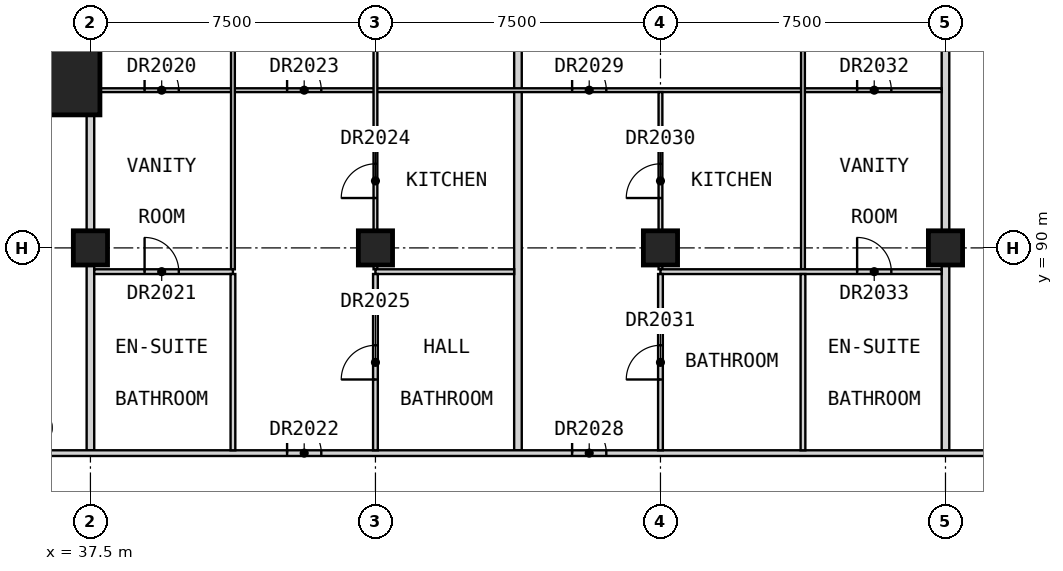
"""IFC4 building model, lengths in metres.
Left out: names, types, materials, properties, quantities, classifications, styles, units other than length and angle.
Written with IfcOpenShell. Run it as: python <this file> out.ifc"""

import sys

from ifc_helpers import new_model, si_unit, direction, frame, frame_2d, origin, origin_2d, place, context, subcontext, project, spatial, rectangle, extrude, element, fill, save


model = new_model("IFC4")
c1 = context("Model", 3, precision=1e-05, world=origin(), true_north=direction((0.0, 1.0)))
c2 = subcontext(c1, "Body", "Model", "MODEL_VIEW")
j1 = project(units=[si_unit("LENGTHUNIT", "METRE"), si_unit("PLANEANGLEUNIT", "RADIAN")], contexts=[c1])
p1 = place(None, origin())
s1 = spatial("IfcSite", under=j1, at=p1, CompositionType="ELEMENT")
p2 = place(p1, origin())
s2 = spatial("IfcBuilding", under=s1, at=p2, CompositionType="ELEMENT")
p3 = place(p2, frame((0.0, 0.0, 182.7)))
s3 = spatial("IfcBuildingStorey", under=s2, at=p3, CompositionType="ELEMENT", Elevation=182.7)
for number, where, z_axis, x_axis in (
    (1, (37.5, 90.0, 0.0), (0.0, 0.0, 1.0), (1.0, 0.0, 0.0)),
    (2, (45.0, 90.0, 0.0), (0.0, 0.0, 1.0), (1.0, 0.0, 0.0)),
    (3, (52.5, 90.0, 0.0), (0.0, 0.0, 1.0), (1.0, 0.0, 0.0)),
    (4, (60.0, 90.0, 0.0), (0.0, 0.0, 1.0), (1.0, 0.0, 0.0)),
):
    element("IfcColumn", number, at=place(p3, frame(where, z_axis=z_axis, x_axis=x_axis)), inside=s3, PredefinedType="COLUMN", context=c2, shape_type="SweptSolid", body=[
        extrude(rectangle(XDim=0.9, YDim=0.9, at=origin_2d()), origin(), (0.0, 0.0, 1.0), 3.5),
    ])
p4 = place(p3, frame((36.125, 95.125, 0.0), z_axis=(0.0, 0.0, 1.0), x_axis=(1.0, 0.0, 0.0)))
e5 = element("IfcColumn", 5, at=p4, inside=s3, PredefinedType="COLUMN", context=c2, shape_type="SweptSolid", body=[
    extrude(rectangle(XDim=3.25, YDim=3.25, at=origin_2d()), origin(), (0.0, 0.0, 1.0), 3.5),
])
p5 = place(p3, frame((37.5, 84.675, 0.0), z_axis=(0.0, 0.0, 1.0), x_axis=(0.0, 1.0, 0.0)))
e6 = element("IfcWall", 6, at=p5, inside=s3, PredefinedType="PARTITIONING", context=c2, shape_type="SweptSolid", body=[
    extrude(rectangle(XDim=16.575, YDim=0.2, at=frame_2d((8.288, 0.0))), origin(), (0.0, 0.0, 1.0), 2.75),
])
p6 = place(p3, frame((48.75, 84.675, 0.0), z_axis=(0.0, 0.0, 1.0), x_axis=(0.0, 1.0, 0.0)))
e7 = element("IfcWall", 7, at=p6, inside=s3, PredefinedType="PARTITIONING", context=c2, shape_type="SweptSolid", body=[
    extrude(rectangle(XDim=15.765, YDim=0.2, at=frame_2d((7.882, 0.0))), origin(), (0.0, 0.0, 1.0), 3.25),
])
p7 = place(p3, frame((60.0, 84.675, 0.0), z_axis=(0.0, 0.0, 1.0), x_axis=(0.0, 1.0, 0.0)))
e8 = element("IfcWall", 8, at=p7, inside=s3, PredefinedType="PARTITIONING", context=c2, shape_type="SweptSolid", body=[
    extrude(rectangle(XDim=16.575, YDim=0.2, at=frame_2d((8.288, 0.0))), origin(), (0.0, 0.0, 1.0), 3.25),
])
p8 = place(p3, frame((33.75, 84.6, 0.0), z_axis=(0.0, 0.0, 1.0), x_axis=(1.0, 0.0, 0.0)))
e9 = element("IfcWall", 9, at=p8, inside=s3, PredefinedType="PARTITIONING", context=c2, shape_type="SweptSolid", body=[
    extrude(rectangle(XDim=28.35, YDim=0.15, at=frame_2d((14.175, 0.0))), origin(), (0.0, 0.0, 1.0), 3.25),
])
p9 = place(p8, frame((1.375, 0.0, 0.0)))
e10 = element("IfcOpeningElement", 10, at=p9, cuts=e9, PredefinedType="OPENING", context=c2, shape_type="SweptSolid", body=[
    extrude(rectangle(XDim=1.0, YDim=2.1, at=frame_2d((0.5, 1.05))), frame((0.0, 0.085, 0.0), z_axis=(0.0, -1.0, 0.0), x_axis=(1.0, 0.0, 0.0)), (0.0, 0.0, 1.0), 0.17),
])
p10 = place(p8, frame((8.925, 0.0, 0.0)))
e11 = element("IfcOpeningElement", 11, at=p10, cuts=e9, PredefinedType="OPENING", context=c2, shape_type="SweptSolid", body=[
    extrude(rectangle(XDim=0.9, YDim=2.1, at=frame_2d((0.45, 1.05))), frame((0.0, 0.085, 0.0), z_axis=(0.0, -1.0, 0.0), x_axis=(1.0, 0.0, 0.0)), (0.0, 0.0, 1.0), 0.17),
])
p11 = place(p8, frame((16.425, 0.0, 0.0)))
e12 = element("IfcOpeningElement", 12, at=p11, cuts=e9, PredefinedType="OPENING", context=c2, shape_type="SweptSolid", body=[
    extrude(rectangle(XDim=0.9, YDim=2.1, at=frame_2d((0.45, 1.05))), frame((0.0, 0.085, 0.0), z_axis=(0.0, -1.0, 0.0), x_axis=(1.0, 0.0, 0.0)), (0.0, 0.0, 1.0), 0.17),
])
p12 = place(p3, frame((37.6, 94.15, 0.0), z_axis=(0.0, 0.0, 1.0), x_axis=(1.0, 0.0, 0.0)))
e13 = element("IfcWall", 13, at=p12, inside=s3, PredefinedType="PARTITIONING", context=c2, shape_type="SweptSolid", body=[
    extrude(rectangle(XDim=22.3, YDim=0.1, at=frame_2d((11.15, 0.0))), origin(), (0.0, 0.0, 1.0), 3.25),
])
p13 = place(p12, frame((1.325, 0.0, 0.0)))
e14 = element("IfcOpeningElement", 14, at=p13, cuts=e13, PredefinedType="OPENING", context=c2, shape_type="SweptSolid", body=[
    extrude(rectangle(XDim=0.9, YDim=2.1, at=frame_2d((0.45, 1.05))), frame((0.0, 0.06, 0.0), z_axis=(0.0, -1.0, 0.0), x_axis=(1.0, 0.0, 0.0)), (0.0, 0.0, 1.0), 0.12),
])
p14 = place(p12, frame((5.075, 0.0, 0.0)))
e15 = element("IfcOpeningElement", 15, at=p14, cuts=e13, PredefinedType="OPENING", context=c2, shape_type="SweptSolid", body=[
    extrude(rectangle(XDim=0.9, YDim=2.1, at=frame_2d((0.45, 1.05))), frame((0.0, 0.06, 0.0), z_axis=(0.0, -1.0, 0.0), x_axis=(1.0, 0.0, 0.0)), (0.0, 0.0, 1.0), 0.12),
])
p15 = place(p12, frame((12.575, 0.0, 0.0)))
e16 = element("IfcOpeningElement", 16, at=p15, cuts=e13, PredefinedType="OPENING", context=c2, shape_type="SweptSolid", body=[
    extrude(rectangle(XDim=0.9, YDim=2.1, at=frame_2d((0.45, 1.05))), frame((0.0, 0.06, 0.0), z_axis=(0.0, -1.0, 0.0), x_axis=(1.0, 0.0, 0.0)), (0.0, 0.0, 1.0), 0.12),
])
p16 = place(p12, frame((20.075, 0.0, 0.0)))
e17 = element("IfcOpeningElement", 17, at=p16, cuts=e13, PredefinedType="OPENING", context=c2, shape_type="SweptSolid", body=[
    extrude(rectangle(XDim=0.9, YDim=2.1, at=frame_2d((0.45, 1.05))), frame((0.0, 0.06, 0.0), z_axis=(0.0, -1.0, 0.0), x_axis=(1.0, 0.0, 0.0)), (0.0, 0.0, 1.0), 0.12),
])
p17 = place(p3, frame((41.25, 89.438, 0.0), z_axis=(0.0, 0.0, 1.0), x_axis=(0.0, 1.0, 0.0)))
e18 = element("IfcWall", 18, at=p17, inside=s3, PredefinedType="PARTITIONING", context=c2, shape_type="SweptSolid", body=[
    extrude(rectangle(XDim=11.002, YDim=0.1, at=frame_2d((5.501, 0.0))), origin(), (0.0, 0.0, 1.0), 3.25),
])
p18 = place(p17, frame((7.812, 0.0, 0.0)))
e19 = element("IfcOpeningElement", 19, at=p18, cuts=e18, PredefinedType="OPENING", context=c2, shape_type="SweptSolid", body=[
    extrude(rectangle(XDim=0.9, YDim=2.1, at=frame_2d((0.45, 1.05))), frame((0.0, 0.06, 0.0), z_axis=(0.0, -1.0, 0.0), x_axis=(1.0, 0.0, 0.0)), (0.0, 0.0, 1.0), 0.12),
])
p19 = place(p3, frame((45.0, 89.438, 0.0), z_axis=(0.0, 0.0, 1.0), x_axis=(0.0, 1.0, 0.0)))
e20 = element("IfcWall", 20, at=p19, inside=s3, PredefinedType="PARTITIONING", context=c2, shape_type="SweptSolid", body=[
    extrude(rectangle(XDim=11.812, YDim=0.1, at=frame_2d((5.906, 0.0))), origin(), (0.0, 0.0, 1.0), 3.25),
])
p20 = place(p19, frame((1.875, 0.0, 0.0)))
e21 = element("IfcOpeningElement", 21, at=p20, cuts=e20, PredefinedType="OPENING", context=c2, shape_type="SweptSolid", body=[
    extrude(rectangle(XDim=0.9, YDim=2.1, at=frame_2d((0.45, 1.05))), frame((0.0, 0.06, 0.0), z_axis=(0.0, -1.0, 0.0), x_axis=(1.0, 0.0, 0.0)), (0.0, 0.0, 1.0), 0.12),
])
p21 = place(p19, frame((8.062, 0.0, 0.0)))
e22 = element("IfcOpeningElement", 22, at=p21, cuts=e20, PredefinedType="OPENING", context=c2, shape_type="SweptSolid", body=[
    extrude(rectangle(XDim=0.9, YDim=2.1, at=frame_2d((0.45, 1.05))), frame((0.0, 0.06, 0.0), z_axis=(0.0, -1.0, 0.0), x_axis=(1.0, 0.0, 0.0)), (0.0, 0.0, 1.0), 0.12),
])
p22 = place(p3, frame((52.5, 89.438, 0.0), z_axis=(0.0, 0.0, 1.0), x_axis=(0.0, 1.0, 0.0)))
e23 = element("IfcWall", 23, at=p22, inside=s3, PredefinedType="PARTITIONING", context=c2, shape_type="SweptSolid", body=[
    extrude(rectangle(XDim=4.663, YDim=0.1, at=frame_2d((2.331, 0.0))), origin(), (0.0, 0.0, 1.0), 3.25),
])
p23 = place(p22, frame((1.875, 0.0, 0.0)))
e24 = element("IfcOpeningElement", 24, at=p23, cuts=e23, PredefinedType="OPENING", context=c2, shape_type="SweptSolid", body=[
    extrude(rectangle(XDim=0.9, YDim=2.1, at=frame_2d((0.45, 1.05))), frame((0.0, 0.06, 0.0), z_axis=(0.0, -1.0, 0.0), x_axis=(1.0, 0.0, 0.0)), (0.0, 0.0, 1.0), 0.12),
])
p24 = place(p3, frame((56.25, 89.438, 0.0), z_axis=(0.0, 0.0, 1.0), x_axis=(0.0, 1.0, 0.0)))
e25 = element("IfcWall", 25, at=p24, inside=s3, PredefinedType="PARTITIONING", context=c2, shape_type="SweptSolid", body=[
    extrude(rectangle(XDim=11.002, YDim=0.1, at=frame_2d((5.501, 0.0))), origin(), (0.0, 0.0, 1.0), 3.25),
])
p25 = place(p24, frame((7.812, 0.0, 0.0)))
e26 = element("IfcOpeningElement", 26, at=p25, cuts=e25, PredefinedType="OPENING", context=c2, shape_type="SweptSolid", body=[
    extrude(rectangle(XDim=0.9, YDim=2.1, at=frame_2d((0.45, 1.05))), frame((0.0, 0.06, 0.0), z_axis=(0.0, -1.0, 0.0), x_axis=(1.0, 0.0, 0.0)), (0.0, 0.0, 1.0), 0.12),
])
p26 = place(p3, frame((37.6, 89.375, 0.0), z_axis=(0.0, 0.0, 1.0), x_axis=(1.0, 0.0, 0.0)))
e27 = element("IfcWall", 27, at=p26, inside=s3, PredefinedType="PARTITIONING", context=c2, shape_type="SweptSolid", body=[
    extrude(rectangle(XDim=3.65, YDim=0.125, at=frame_2d((1.825, 0.0))), origin(), (0.0, 0.0, 1.0), 3.25),
])
p27 = place(p26, frame((1.325, 0.0, 0.0)))
e28 = element("IfcOpeningElement", 28, at=p27, cuts=e27, PredefinedType="OPENING", context=c2, shape_type="SweptSolid", body=[
    extrude(rectangle(XDim=0.9, YDim=2.1, at=frame_2d((0.45, 1.05))), frame((0.0, 0.073, 0.0), z_axis=(0.0, -1.0, 0.0), x_axis=(1.0, 0.0, 0.0)), (0.0, 0.0, 1.0), 0.145),
])
p28 = place(p3, frame((45.0, 89.375, 0.0), z_axis=(0.0, 0.0, 1.0), x_axis=(1.0, 0.0, 0.0)))
e29 = element("IfcWall", 29, at=p28, inside=s3, PredefinedType="PARTITIONING", context=c2, shape_type="SweptSolid", body=[
    extrude(rectangle(XDim=3.65, YDim=0.125, at=frame_2d((1.825, 0.0))), origin(), (0.0, 0.0, 1.0), 3.25),
])
p29 = place(p3, frame((52.5, 89.375, 0.0), z_axis=(0.0, 0.0, 1.0), x_axis=(1.0, 0.0, 0.0)))
e30 = element("IfcWall", 30, at=p29, inside=s3, PredefinedType="PARTITIONING", context=c2, shape_type="SweptSolid", body=[
    extrude(rectangle(XDim=7.4, YDim=0.125, at=frame_2d((3.7, 0.0))), origin(), (0.0, 0.0, 1.0), 3.25),
])
p30 = place(p29, frame((5.175, 0.0, 0.0)))
e31 = element("IfcOpeningElement", 31, at=p30, cuts=e30, PredefinedType="OPENING", context=c2, shape_type="SweptSolid", body=[
    extrude(rectangle(XDim=0.9, YDim=2.1, at=frame_2d((0.45, 1.05))), frame((0.0, 0.073, 0.0), z_axis=(0.0, -1.0, 0.0), x_axis=(1.0, 0.0, 0.0)), (0.0, 0.0, 1.0), 0.145),
])
p31 = place(p3, frame((41.25, 84.675, 0.0), z_axis=(0.0, 0.0, 1.0), x_axis=(0.0, 1.0, 0.0)))
e32 = element("IfcWall", 32, at=p31, inside=s3, PredefinedType="PARTITIONING", context=c2, shape_type="SweptSolid", body=[
    extrude(rectangle(XDim=4.637, YDim=0.125, at=frame_2d((2.319, 0.0))), origin(), (0.0, 0.0, 1.0), 3.25),
])
p32 = place(p3, frame((45.0, 84.675, 0.0), z_axis=(0.0, 0.0, 1.0), x_axis=(0.0, 1.0, 0.0)))
e33 = element("IfcWall", 33, at=p32, inside=s3, PredefinedType="PARTITIONING", context=c2, shape_type="SweptSolid", body=[
    extrude(rectangle(XDim=4.637, YDim=0.125, at=frame_2d((2.319, 0.0))), origin(), (0.0, 0.0, 1.0), 3.25),
])
p33 = place(p32, frame((1.863, 0.0, 0.0)))
e34 = element("IfcOpeningElement", 34, at=p33, cuts=e33, PredefinedType="OPENING", context=c2, shape_type="SweptSolid", body=[
    extrude(rectangle(XDim=0.9, YDim=2.1, at=frame_2d((0.45, 1.05))), frame((0.0, 0.073, 0.0), z_axis=(0.0, -1.0, 0.0), x_axis=(1.0, 0.0, 0.0)), (0.0, 0.0, 1.0), 0.145),
])
p34 = place(p3, frame((52.5, 84.675, 0.0), z_axis=(0.0, 0.0, 1.0), x_axis=(0.0, 1.0, 0.0)))
e35 = element("IfcWall", 35, at=p34, inside=s3, PredefinedType="PARTITIONING", context=c2, shape_type="SweptSolid", body=[
    extrude(rectangle(XDim=4.637, YDim=0.125, at=frame_2d((2.319, 0.0))), origin(), (0.0, 0.0, 1.0), 3.25),
])
p35 = place(p34, frame((1.863, 0.0, 0.0)))
e36 = element("IfcOpeningElement", 36, at=p35, cuts=e35, PredefinedType="OPENING", context=c2, shape_type="SweptSolid", body=[
    extrude(rectangle(XDim=0.9, YDim=2.1, at=frame_2d((0.45, 1.05))), frame((0.0, 0.073, 0.0), z_axis=(0.0, -1.0, 0.0), x_axis=(1.0, 0.0, 0.0)), (0.0, 0.0, 1.0), 0.145),
])
p36 = place(p3, frame((56.25, 84.675, 0.0), z_axis=(0.0, 0.0, 1.0), x_axis=(0.0, 1.0, 0.0)))
e37 = element("IfcWall", 37, at=p36, inside=s3, PredefinedType="PARTITIONING", context=c2, shape_type="SweptSolid", body=[
    extrude(rectangle(XDim=4.637, YDim=0.125, at=frame_2d((2.319, 0.0))), origin(), (0.0, 0.0, 1.0), 3.25),
])
p37 = place(p13, origin())
e38 = element("IfcDoor", 38, at=p37, inside=s3, OperationType="SINGLE_SWING_RIGHT", PredefinedType="DOOR", context=c2, shape_type="SweptSolid", body=[
    extrude(rectangle(XDim=0.9, YDim=2.1, at=frame_2d((0.45, 1.05))), frame((0.0, 0.025, 0.0), z_axis=(0.0, -1.0, 0.0), x_axis=(1.0, 0.0, 0.0)), (0.0, 0.0, 1.0), 0.05),
])
fill(e14, e38)
p38 = place(p27, origin())
e39 = element("IfcDoor", 39, at=p38, inside=s3, OperationType="SINGLE_SWING_RIGHT", PredefinedType="DOOR", context=c2, shape_type="SweptSolid", body=[
    extrude(rectangle(XDim=0.9, YDim=2.1, at=frame_2d((0.45, 1.05))), frame((0.0, 0.025, 0.0), z_axis=(0.0, -1.0, 0.0), x_axis=(1.0, 0.0, 0.0)), (0.0, 0.0, 1.0), 0.05),
])
fill(e28, e39)
p39 = place(p10, origin())
e40 = element("IfcDoor", 40, at=p39, inside=s3, OperationType="SINGLE_SWING_LEFT", PredefinedType="DOOR", context=c2, shape_type="SweptSolid", body=[
    extrude(rectangle(XDim=0.9, YDim=2.1, at=frame_2d((0.45, 1.05))), frame((0.0, 0.025, 0.0), z_axis=(0.0, -1.0, 0.0), x_axis=(1.0, 0.0, 0.0)), (0.0, 0.0, 1.0), 0.05),
])
fill(e11, e40)
p40 = place(p14, origin())
e41 = element("IfcDoor", 41, at=p40, inside=s3, OperationType="SINGLE_SWING_RIGHT", PredefinedType="DOOR", context=c2, shape_type="SweptSolid", body=[
    extrude(rectangle(XDim=0.9, YDim=2.1, at=frame_2d((0.45, 1.05))), frame((0.0, 0.025, 0.0), z_axis=(0.0, -1.0, 0.0), x_axis=(1.0, 0.0, 0.0)), (0.0, 0.0, 1.0), 0.05),
])
fill(e15, e41)
p41 = place(p20, origin())
e42 = element("IfcDoor", 42, at=p41, inside=s3, OperationType="SINGLE_SWING_LEFT", PredefinedType="DOOR", context=c2, shape_type="SweptSolid", body=[
    extrude(rectangle(XDim=0.9, YDim=2.1, at=frame_2d((0.45, 1.05))), frame((0.0, 0.025, 0.0), z_axis=(0.0, -1.0, 0.0), x_axis=(1.0, 0.0, 0.0)), (0.0, 0.0, 1.0), 0.05),
])
fill(e21, e42)
p42 = place(p33, origin())
e43 = element("IfcDoor", 43, at=p42, inside=s3, OperationType="SINGLE_SWING_RIGHT", PredefinedType="DOOR", context=c2, shape_type="SweptSolid", body=[
    extrude(rectangle(XDim=0.9, YDim=2.1, at=frame_2d((0.45, 1.05))), frame((0.0, 0.025, 0.0), z_axis=(0.0, -1.0, 0.0), x_axis=(1.0, 0.0, 0.0)), (0.0, 0.0, 1.0), 0.05),
])
fill(e34, e43)
p43 = place(p11, origin())
e44 = element("IfcDoor", 44, at=p43, inside=s3, OperationType="SINGLE_SWING_LEFT", PredefinedType="DOOR", context=c2, shape_type="SweptSolid", body=[
    extrude(rectangle(XDim=0.9, YDim=2.1, at=frame_2d((0.45, 1.05))), frame((0.0, 0.025, 0.0), z_axis=(0.0, -1.0, 0.0), x_axis=(1.0, 0.0, 0.0)), (0.0, 0.0, 1.0), 0.05),
])
fill(e12, e44)
p44 = place(p15, origin())
e45 = element("IfcDoor", 45, at=p44, inside=s3, OperationType="SINGLE_SWING_RIGHT", PredefinedType="DOOR", context=c2, shape_type="SweptSolid", body=[
    extrude(rectangle(XDim=0.9, YDim=2.1, at=frame_2d((0.45, 1.05))), frame((0.0, 0.025, 0.0), z_axis=(0.0, -1.0, 0.0), x_axis=(1.0, 0.0, 0.0)), (0.0, 0.0, 1.0), 0.05),
])
fill(e16, e45)
p45 = place(p23, origin())
e46 = element("IfcDoor", 46, at=p45, inside=s3, OperationType="SINGLE_SWING_LEFT", PredefinedType="DOOR", context=c2, shape_type="SweptSolid", body=[
    extrude(rectangle(XDim=0.9, YDim=2.1, at=frame_2d((0.45, 1.05))), frame((0.0, 0.025, 0.0), z_axis=(0.0, -1.0, 0.0), x_axis=(1.0, 0.0, 0.0)), (0.0, 0.0, 1.0), 0.05),
])
fill(e24, e46)
p46 = place(p35, origin())
e47 = element("IfcDoor", 47, at=p46, inside=s3, OperationType="SINGLE_SWING_RIGHT", PredefinedType="DOOR", context=c2, shape_type="SweptSolid", body=[
    extrude(rectangle(XDim=0.9, YDim=2.1, at=frame_2d((0.45, 1.05))), frame((0.0, 0.025, 0.0), z_axis=(0.0, -1.0, 0.0), x_axis=(1.0, 0.0, 0.0)), (0.0, 0.0, 1.0), 0.05),
])
fill(e36, e47)
p47 = place(p16, origin())
e48 = element("IfcDoor", 48, at=p47, inside=s3, OperationType="SINGLE_SWING_RIGHT", PredefinedType="DOOR", context=c2, shape_type="SweptSolid", body=[
    extrude(rectangle(XDim=0.9, YDim=2.1, at=frame_2d((0.45, 1.05))), frame((0.0, 0.025, 0.0), z_axis=(0.0, -1.0, 0.0), x_axis=(1.0, 0.0, 0.0)), (0.0, 0.0, 1.0), 0.05),
])
fill(e17, e48)
p48 = place(p30, origin())
e49 = element("IfcDoor", 49, at=p48, inside=s3, OperationType="SINGLE_SWING_RIGHT", PredefinedType="DOOR", context=c2, shape_type="SweptSolid", body=[
    extrude(rectangle(XDim=0.9, YDim=2.1, at=frame_2d((0.45, 1.05))), frame((0.0, 0.025, 0.0), z_axis=(0.0, -1.0, 0.0), x_axis=(1.0, 0.0, 0.0)), (0.0, 0.0, 1.0), 0.05),
])
fill(e31, e49)
save(model, sys.argv[1])
